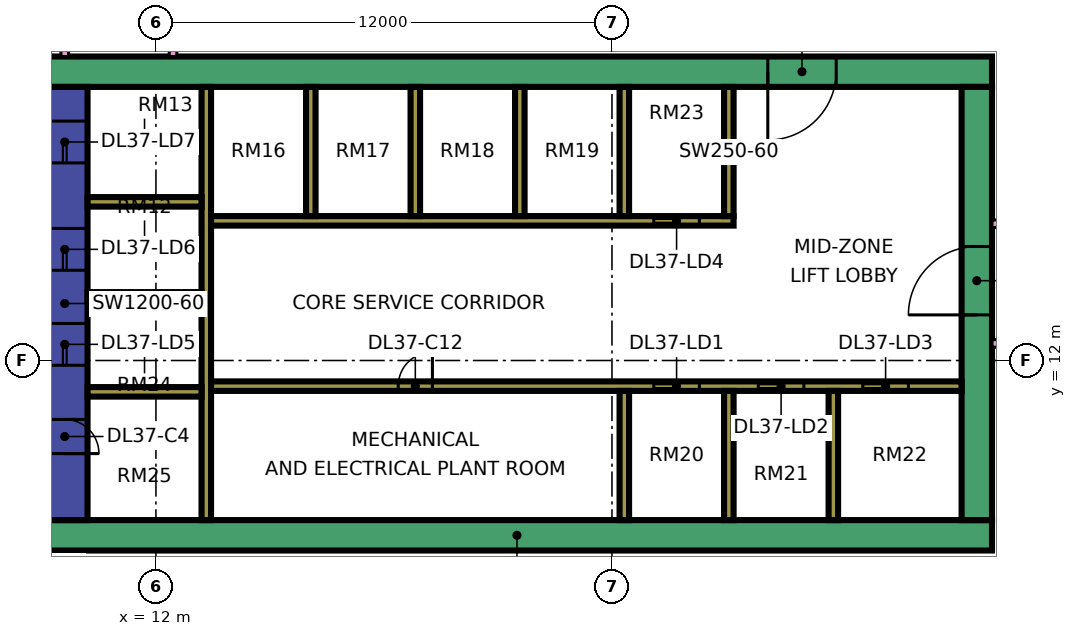
"""IFC4 building model, lengths in metres.
Left out: names, types, materials, properties, quantities, classifications, styles, units other than length and angle.
Written with IfcOpenShell. Run it as: python <this file> out.ifc"""

import sys

from ifc_helpers import new_model, si_unit, direction, frame, frame_2d, origin, place, context, subcontext, project, spatial, rectangle, extrude, element, fill, save


model = new_model("IFC4")
c1 = context("Model", 3, precision=1e-05, world=origin(), true_north=direction((0.0, 1.0)))
c2 = subcontext(c1, "Body", "Model", "MODEL_VIEW")
j1 = project(units=[si_unit("LENGTHUNIT", "METRE"), si_unit("PLANEANGLEUNIT", "RADIAN")], contexts=[c1])
p1 = place(None, origin())
s1 = spatial("IfcSite", under=j1, at=p1, CompositionType="ELEMENT")
p2 = place(p1, origin())
s2 = spatial("IfcBuilding", under=s1, at=p2, CompositionType="ELEMENT")
p3 = place(p2, frame((0.0, 0.0, 164.9)))
s3 = spatial("IfcBuildingStorey", under=s2, at=p3, CompositionType="ELEMENT", Elevation=164.9)
p4 = place(p3, frame((9.0, 7.4, 0.0), z_axis=(0.0, 0.0, 1.0), x_axis=(1.0, 0.0, 0.0)))
e1 = element("IfcWall", 1, at=p4, inside=s3, PredefinedType="SHEAR", context=c2, shape_type="SweptSolid", body=[
    extrude(rectangle(XDim=25.0, YDim=0.8, at=frame_2d((12.5, 0.0))), origin(), (0.0, 0.0, 1.0), 3.75),
])
p5 = place(p3, frame((9.0, 19.6, 0.0), z_axis=(0.0, 0.0, 1.0), x_axis=(1.0, 0.0, 0.0)))
e2 = element("IfcWall", 2, at=p5, inside=s3, PredefinedType="SHEAR", context=c2, shape_type="SweptSolid", body=[
    extrude(rectangle(XDim=25.0, YDim=0.8, at=frame_2d((12.5, 0.0))), origin(), (0.0, 0.0, 1.0), 3.75),
])
p6 = place(p5, frame((19.1, 0.0, 0.0)))
e3 = element("IfcOpeningElement", 3, at=p6, cuts=e2, PredefinedType="OPENING", context=c2, shape_type="SweptSolid", body=[
    extrude(rectangle(XDim=1.8, YDim=2.4, at=frame_2d((0.9, 1.2))), frame((0.0, 0.41, 0.0), z_axis=(0.0, -1.0, 0.0), x_axis=(1.0, 0.0, 0.0)), (0.0, 0.0, 1.0), 0.82),
])
p7 = place(p3, frame((9.6, 7.8, 0.0), z_axis=(0.0, 0.0, 1.0), x_axis=(0.0, 1.0, 0.0)))
e4 = element("IfcWall", 4, at=p7, inside=s3, PredefinedType="SHEAR", context=c2, shape_type="SweptSolid", body=[
    extrude(rectangle(XDim=11.4, YDim=1.2, at=frame_2d((5.7, 0.0))), origin(), (0.0, 0.0, 1.0), 3.75),
])
p8 = place(p7, frame((4.075, 0.0, 0.0)))
e5 = element("IfcOpeningElement", 5, at=p8, cuts=e4, PredefinedType="OPENING", context=c2, shape_type="SweptSolid", body=[
    extrude(rectangle(XDim=1.1, YDim=2.2, at=frame_2d((0.55, 1.1))), frame((0.0, 0.61, 0.0), z_axis=(0.0, -1.0, 0.0), x_axis=(1.0, 0.0, 0.0)), (0.0, 0.0, 1.0), 1.22),
])
p9 = place(p7, frame((6.575, 0.0, 0.0)))
e6 = element("IfcOpeningElement", 6, at=p9, cuts=e4, PredefinedType="OPENING", context=c2, shape_type="SweptSolid", body=[
    extrude(rectangle(XDim=1.1, YDim=2.2, at=frame_2d((0.55, 1.1))), frame((0.0, 0.61, 0.0), z_axis=(0.0, -1.0, 0.0), x_axis=(1.0, 0.0, 0.0)), (0.0, 0.0, 1.0), 1.22),
])
p10 = place(p7, frame((9.4, 0.0, 0.0)))
e7 = element("IfcOpeningElement", 7, at=p10, cuts=e4, PredefinedType="OPENING", context=c2, shape_type="SweptSolid", body=[
    extrude(rectangle(XDim=1.1, YDim=2.2, at=frame_2d((0.55, 1.1))), frame((0.0, 0.61, 0.0), z_axis=(0.0, -1.0, 0.0), x_axis=(1.0, 0.0, 0.0)), (0.0, 0.0, 1.0), 1.22),
])
p11 = place(p7, frame((1.75, 0.0, 0.0)))
e8 = element("IfcOpeningElement", 8, at=p11, cuts=e4, PredefinedType="OPENING", context=c2, shape_type="SweptSolid", body=[
    extrude(rectangle(XDim=0.9, YDim=2.1, at=frame_2d((0.45, 1.05))), frame((0.0, 0.61, 0.0), z_axis=(0.0, -1.0, 0.0), x_axis=(1.0, 0.0, 0.0)), (0.0, 0.0, 1.0), 1.22),
])
p12 = place(p3, frame((33.6, 7.8, 0.0), z_axis=(0.0, 0.0, 1.0), x_axis=(0.0, 1.0, 0.0)))
e9 = element("IfcWall", 9, at=p12, inside=s3, PredefinedType="SHEAR", context=c2, shape_type="SweptSolid", body=[
    extrude(rectangle(XDim=11.4, YDim=0.8, at=frame_2d((5.7, 0.0))), origin(), (0.0, 0.0, 1.0), 3.75),
])
p13 = place(p12, frame((5.4, 0.0, 0.0)))
e10 = element("IfcOpeningElement", 10, at=p13, cuts=e9, PredefinedType="OPENING", context=c2, shape_type="SweptSolid", body=[
    extrude(rectangle(XDim=1.8, YDim=2.4, at=frame_2d((0.9, 1.2))), frame((0.0, 0.41, 0.0), z_axis=(0.0, -1.0, 0.0), x_axis=(1.0, 0.0, 0.0)), (0.0, 0.0, 1.0), 0.82),
])
p14 = place(p3, frame((13.325, 7.8, 0.0), z_axis=(0.0, 0.0, 1.0), x_axis=(0.0, 1.0, 0.0)))
e11 = element("IfcWall", 11, at=p14, inside=s3, PredefinedType="SHEAR", context=c2, shape_type="SweptSolid", body=[
    extrude(rectangle(XDim=11.4, YDim=0.25, at=frame_2d((5.7, 0.0))), origin(), (0.0, 0.0, 1.0), 3.75),
])
p15 = place(p3, frame((13.45, 11.325, 0.0), z_axis=(0.0, 0.0, 1.0), x_axis=(1.0, 0.0, 0.0)))
e12 = element("IfcWall", 12, at=p15, inside=s3, PredefinedType="SHEAR", context=c2, shape_type="SweptSolid", body=[
    extrude(rectangle(XDim=19.75, YDim=0.25, at=frame_2d((9.875, 0.0))), origin(), (0.0, 0.0, 1.0), 3.75),
])
p16 = place(p15, frame((11.65, 0.0, 0.0)))
e13 = element("IfcOpeningElement", 13, at=p16, cuts=e12, PredefinedType="OPENING", context=c2, shape_type="SweptSolid", body=[
    extrude(rectangle(XDim=1.2, YDim=2.2, at=frame_2d((0.6, 1.1))), frame((0.0, 0.135, 0.0), z_axis=(0.0, -1.0, 0.0), x_axis=(1.0, 0.0, 0.0)), (0.0, 0.0, 1.0), 0.27),
])
p17 = place(p15, frame((14.4, 0.0, 0.0)))
e14 = element("IfcOpeningElement", 14, at=p17, cuts=e12, PredefinedType="OPENING", context=c2, shape_type="SweptSolid", body=[
    extrude(rectangle(XDim=1.2, YDim=2.2, at=frame_2d((0.6, 1.1))), frame((0.0, 0.135, 0.0), z_axis=(0.0, -1.0, 0.0), x_axis=(1.0, 0.0, 0.0)), (0.0, 0.0, 1.0), 0.27),
])
p18 = place(p15, frame((17.15, 0.0, 0.0)))
e15 = element("IfcOpeningElement", 15, at=p18, cuts=e12, PredefinedType="OPENING", context=c2, shape_type="SweptSolid", body=[
    extrude(rectangle(XDim=1.2, YDim=2.2, at=frame_2d((0.6, 1.1))), frame((0.0, 0.135, 0.0), z_axis=(0.0, -1.0, 0.0), x_axis=(1.0, 0.0, 0.0)), (0.0, 0.0, 1.0), 0.27),
])
p19 = place(p15, frame((4.925, 0.0, 0.0)))
e16 = element("IfcOpeningElement", 16, at=p19, cuts=e12, PredefinedType="OPENING", context=c2, shape_type="SweptSolid", body=[
    extrude(rectangle(XDim=0.9, YDim=2.1, at=frame_2d((0.45, 1.05))), frame((0.0, 0.135, 0.0), z_axis=(0.0, -1.0, 0.0), x_axis=(1.0, 0.0, 0.0)), (0.0, 0.0, 1.0), 0.27),
])
p20 = place(p3, frame((13.45, 15.675, 0.0), z_axis=(0.0, 0.0, 1.0), x_axis=(1.0, 0.0, 0.0)))
e17 = element("IfcWall", 17, at=p20, inside=s3, PredefinedType="SHEAR", context=c2, shape_type="SweptSolid", body=[
    extrude(rectangle(XDim=13.75, YDim=0.25, at=frame_2d((6.875, 0.0))), origin(), (0.0, 0.0, 1.0), 3.75),
])
p21 = place(p20, frame((11.65, 0.0, 0.0)))
e18 = element("IfcOpeningElement", 18, at=p21, cuts=e17, PredefinedType="OPENING", context=c2, shape_type="SweptSolid", body=[
    extrude(rectangle(XDim=1.2, YDim=2.2, at=frame_2d((0.6, 1.1))), frame((0.0, 0.135, 0.0), z_axis=(0.0, -1.0, 0.0), x_axis=(1.0, 0.0, 0.0)), (0.0, 0.0, 1.0), 0.27),
])
for number, where, z_axis, x_axis in (
    (19, (10.2, 11.175, 0.0), (0.0, 0.0, 1.0), (1.0, 0.0, 0.0)),
    (20, (10.2, 13.675, 0.0), (0.0, 0.0, 1.0), (1.0, 0.0, 0.0)),
    (21, (10.2, 16.175, 0.0), (0.0, 0.0, 1.0), (1.0, 0.0, 0.0)),
):
    element("IfcWall", number, at=place(p3, frame(where, z_axis=z_axis, x_axis=x_axis)), inside=s3, PredefinedType="SHEAR", context=c2, shape_type="SweptSolid", body=[
        extrude(rectangle(XDim=3.0, YDim=0.25, at=frame_2d((1.5, 0.0))), origin(), (0.0, 0.0, 1.0), 3.75),
    ])
for number, where, z_axis, x_axis in (
    (22, (24.325, 7.8, 0.0), (0.0, 0.0, 1.0), (0.0, 1.0, 0.0)),
    (23, (27.075, 7.8, 0.0), (0.0, 0.0, 1.0), (0.0, 1.0, 0.0)),
    (24, (29.825, 7.8, 0.0), (0.0, 0.0, 1.0), (0.0, 1.0, 0.0)),
    (25, (16.075, 15.8, 0.0), (0.0, 0.0, 1.0), (0.0, 1.0, 0.0)),
    (26, (18.825, 15.8, 0.0), (0.0, 0.0, 1.0), (0.0, 1.0, 0.0)),
    (27, (21.575, 15.8, 0.0), (0.0, 0.0, 1.0), (0.0, 1.0, 0.0)),
    (28, (24.325, 15.8, 0.0), (0.0, 0.0, 1.0), (0.0, 1.0, 0.0)),
    (29, (27.075, 15.8, 0.0), (0.0, 0.0, 1.0), (0.0, 1.0, 0.0)),
):
    element("IfcWall", number, at=place(p3, frame(where, z_axis=z_axis, x_axis=x_axis)), inside=s3, PredefinedType="SHEAR", context=c2, shape_type="SweptSolid", body=[
        extrude(rectangle(XDim=3.4, YDim=0.25, at=frame_2d((1.7, 0.0))), origin(), (0.0, 0.0, 1.0), 3.75),
    ])
p22 = place(p3, frame((-1.447, 12.553, 0.0), z_axis=(0.0, 0.0, 1.0), x_axis=(0.707106781187, -0.707106781187, 0.0)))
e30 = element("IfcWall", 30, at=p22, inside=s3, PredefinedType="SOLIDWALL", context=c2, shape_type="SweptSolid", body=[
    extrude(rectangle(XDim=19.799, YDim=0.15, at=frame_2d((9.899, 0.0))), origin(), (0.0, 0.0, 1.0), 3.35),
])
p23 = place(p22, frame((2.212, 0.0, 0.45)))
e31 = element("IfcOpeningElement", 31, at=p23, cuts=e30, PredefinedType="OPENING", context=c2, shape_type="SweptSolid", body=[
    extrude(rectangle(XDim=3.0, YDim=2.4, at=frame_2d((1.5, 1.2))), frame((0.0, 0.085, 0.0), z_axis=(0.0, -1.0, 0.0), x_axis=(1.0, 0.0, 0.0)), (0.0, 0.0, 1.0), 0.17),
])
p24 = place(p22, frame((10.216, 0.0, 0.45)))
e32 = element("IfcOpeningElement", 32, at=p24, cuts=e30, PredefinedType="OPENING", context=c2, shape_type="SweptSolid", body=[
    extrude(rectangle(XDim=3.0, YDim=2.4, at=frame_2d((1.5, 1.2))), frame((0.0, 0.085, 0.0), z_axis=(0.0, -1.0, 0.0), x_axis=(1.0, 0.0, 0.0)), (0.0, 0.0, 1.0), 0.17),
])
p25 = place(p3, frame((9.6, 20.0, 0.0), z_axis=(0.0, 0.0, 1.0), x_axis=(0.0, 1.0, 0.0)))
e33 = element("IfcWall", 33, at=p25, inside=s3, PredefinedType="PARTITIONING", context=c2, shape_type="SweptSolid", body=[
    extrude(rectangle(XDim=44.35, YDim=0.2, at=frame_2d((22.175, 0.0))), origin(), (0.0, 0.0, 1.0), 3.35),
])
p26 = place(p25, frame((28.8, 0.0, 0.0)))
e34 = element("IfcOpeningElement", 34, at=p26, cuts=e33, PredefinedType="OPENING", context=c2, shape_type="SweptSolid", body=[
    extrude(rectangle(XDim=1.0, YDim=2.1, at=frame_2d((0.5, 1.05))), frame((0.0, 0.11, 0.0), z_axis=(0.0, -1.0, 0.0), x_axis=(1.0, 0.0, 0.0)), (0.0, 0.0, 1.0), 0.22),
])
p27 = place(p25, frame((32.1, 0.0, 0.0)))
e35 = element("IfcOpeningElement", 35, at=p27, cuts=e33, PredefinedType="OPENING", context=c2, shape_type="SweptSolid", body=[
    extrude(rectangle(XDim=1.0, YDim=2.1, at=frame_2d((0.5, 1.05))), frame((0.0, 0.11, 0.0), z_axis=(0.0, -1.0, 0.0), x_axis=(1.0, 0.0, 0.0)), (0.0, 0.0, 1.0), 0.22),
])
p28 = place(p25, frame((0.6, 0.0, 0.0)))
e36 = element("IfcOpeningElement", 36, at=p28, cuts=e33, PredefinedType="OPENING", context=c2, shape_type="SweptSolid", body=[
    extrude(rectangle(XDim=1.2, YDim=2.1, at=frame_2d((0.6, 1.05))), frame((0.0, 0.11, 0.0), z_axis=(0.0, -1.0, 0.0), x_axis=(1.0, 0.0, 0.0)), (0.0, 0.0, 1.0), 0.22),
])
p29 = place(p25, frame((14.25, 0.0, 0.0)))
e37 = element("IfcOpeningElement", 37, at=p29, cuts=e33, PredefinedType="OPENING", context=c2, shape_type="SweptSolid", body=[
    extrude(rectangle(XDim=1.0, YDim=2.1, at=frame_2d((0.5, 1.05))), frame((0.0, 0.11, 0.0), z_axis=(0.0, -1.0, 0.0), x_axis=(1.0, 0.0, 0.0)), (0.0, 0.0, 1.0), 0.22),
])
p30 = place(p3, frame((12.45, 20.0, 0.0), z_axis=(0.0, 0.0, 1.0), x_axis=(0.0, 1.0, 0.0)))
e38 = element("IfcWall", 38, at=p30, inside=s3, PredefinedType="PARTITIONING", context=c2, shape_type="SweptSolid", body=[
    extrude(rectangle(XDim=42.926, YDim=0.2, at=frame_2d((21.463, 0.0))), origin(), (0.0, 0.0, 1.0), 3.35),
])
p31 = place(p30, frame((6.55, 0.0, 0.0)))
e39 = element("IfcOpeningElement", 39, at=p31, cuts=e38, PredefinedType="OPENING", context=c2, shape_type="SweptSolid", body=[
    extrude(rectangle(XDim=1.0, YDim=2.1, at=frame_2d((0.5, 1.05))), frame((0.0, 0.11, 0.0), z_axis=(0.0, -1.0, 0.0), x_axis=(1.0, 0.0, 0.0)), (0.0, 0.0, 1.0), 0.22),
])
p32 = place(p30, frame((12.25, 0.0, 0.0)))
e40 = element("IfcOpeningElement", 40, at=p32, cuts=e38, PredefinedType="OPENING", context=c2, shape_type="SweptSolid", body=[
    extrude(rectangle(XDim=1.6, YDim=2.1, at=frame_2d((0.8, 1.05))), frame((0.0, 0.11, 0.0), z_axis=(0.0, -1.0, 0.0), x_axis=(1.0, 0.0, 0.0)), (0.0, 0.0, 1.0), 0.22),
])
p33 = place(p30, frame((16.9, 0.0, 0.0)))
e41 = element("IfcOpeningElement", 41, at=p33, cuts=e38, PredefinedType="OPENING", context=c2, shape_type="SweptSolid", body=[
    extrude(rectangle(XDim=1.0, YDim=2.1, at=frame_2d((0.5, 1.05))), frame((0.0, 0.11, 0.0), z_axis=(0.0, -1.0, 0.0), x_axis=(1.0, 0.0, 0.0)), (0.0, 0.0, 1.0), 0.22),
])
p34 = place(p30, frame((40.9, 0.0, 0.0)))
e42 = element("IfcOpeningElement", 42, at=p34, cuts=e38, PredefinedType="OPENING", context=c2, shape_type="SweptSolid", body=[
    extrude(rectangle(XDim=1.0, YDim=2.1, at=frame_2d((0.5, 1.05))), frame((0.0, 0.11, 0.0), z_axis=(0.0, -1.0, 0.0), x_axis=(1.0, 0.0, 0.0)), (0.0, 0.0, 1.0), 0.22),
])
p35 = place(p30, frame((1.15, 0.0, 0.0)))
e43 = element("IfcOpeningElement", 43, at=p35, cuts=e38, PredefinedType="OPENING", context=c2, shape_type="SweptSolid", body=[
    extrude(rectangle(XDim=1.8, YDim=2.1, at=frame_2d((0.9, 1.05))), frame((0.0, 0.11, 0.0), z_axis=(0.0, -1.0, 0.0), x_axis=(1.0, 0.0, 0.0)), (0.0, 0.0, 1.0), 0.22),
])
p36 = place(p30, frame((28.6, 0.0, 0.0)))
e44 = element("IfcOpeningElement", 44, at=p36, cuts=e38, PredefinedType="OPENING", context=c2, shape_type="SweptSolid", body=[
    extrude(rectangle(XDim=1.8, YDim=2.1, at=frame_2d((0.9, 1.05))), frame((0.0, 0.11, 0.0), z_axis=(0.0, -1.0, 0.0), x_axis=(1.0, 0.0, 0.0)), (0.0, 0.0, 1.0), 0.22),
])
p37 = place(p3, frame((34.0, 12.45, 0.0), z_axis=(0.0, 0.0, 1.0), x_axis=(1.0, 0.0, 0.0)))
e45 = element("IfcWall", 45, at=p37, inside=s3, PredefinedType="PARTITIONING", context=c2, shape_type="SweptSolid", body=[
    extrude(rectangle(XDim=2.451, YDim=0.2, at=frame_2d((1.226, 0.0))), origin(), (0.0, 0.0, 1.0), 3.35),
])
p38 = place(p3, frame((34.0, 15.6, 0.0), z_axis=(0.0, 0.0, 1.0), x_axis=(1.0, 0.0, 0.0)))
e46 = element("IfcWall", 46, at=p38, inside=s3, PredefinedType="PARTITIONING", context=c2, shape_type="SweptSolid", body=[
    extrude(rectangle(XDim=10.35, YDim=0.2, at=frame_2d((5.175, 0.0))), origin(), (0.0, 0.0, 1.0), 3.35),
])
p39 = place(p38, frame((5.6, 0.0, 0.0)))
e47 = element("IfcOpeningElement", 47, at=p39, cuts=e46, PredefinedType="OPENING", context=c2, shape_type="SweptSolid", body=[
    extrude(rectangle(XDim=1.0, YDim=2.1, at=frame_2d((0.5, 1.05))), frame((0.0, 0.11, 0.0), z_axis=(0.0, -1.0, 0.0), x_axis=(1.0, 0.0, 0.0)), (0.0, 0.0, 1.0), 0.22),
])
p40 = place(p38, frame((0.45, 0.0, 0.0)))
e48 = element("IfcOpeningElement", 48, at=p40, cuts=e46, PredefinedType="OPENING", context=c2, shape_type="SweptSolid", body=[
    extrude(rectangle(XDim=1.2, YDim=2.1, at=frame_2d((0.6, 1.05))), frame((0.0, 0.11, 0.0), z_axis=(0.0, -1.0, 0.0), x_axis=(1.0, 0.0, 0.0)), (0.0, 0.0, 1.0), 0.22),
])
p41 = place(p16, origin())
e49 = element("IfcDoor", 49, at=p41, inside=s3, OperationType="DOUBLE_DOOR_SLIDING", PredefinedType="DOOR", context=c2, shape_type="SweptSolid", body=[
    extrude(rectangle(XDim=1.2, YDim=2.2, at=frame_2d((0.6, 1.1))), frame((0.0, 0.025, 0.0), z_axis=(0.0, -1.0, 0.0), x_axis=(1.0, 0.0, 0.0)), (0.0, 0.0, 1.0), 0.05),
])
fill(e13, e49)
p42 = place(p17, origin())
e50 = element("IfcDoor", 50, at=p42, inside=s3, OperationType="DOUBLE_DOOR_SLIDING", PredefinedType="DOOR", context=c2, shape_type="SweptSolid", body=[
    extrude(rectangle(XDim=1.2, YDim=2.2, at=frame_2d((0.6, 1.1))), frame((0.0, 0.025, 0.0), z_axis=(0.0, -1.0, 0.0), x_axis=(1.0, 0.0, 0.0)), (0.0, 0.0, 1.0), 0.05),
])
fill(e14, e50)
p43 = place(p18, origin())
e51 = element("IfcDoor", 51, at=p43, inside=s3, OperationType="DOUBLE_DOOR_SLIDING", PredefinedType="DOOR", context=c2, shape_type="SweptSolid", body=[
    extrude(rectangle(XDim=1.2, YDim=2.2, at=frame_2d((0.6, 1.1))), frame((0.0, 0.025, 0.0), z_axis=(0.0, -1.0, 0.0), x_axis=(1.0, 0.0, 0.0)), (0.0, 0.0, 1.0), 0.05),
])
fill(e15, e51)
p44 = place(p21, origin())
e52 = element("IfcDoor", 52, at=p44, inside=s3, OperationType="DOUBLE_DOOR_SLIDING", PredefinedType="DOOR", context=c2, shape_type="SweptSolid", body=[
    extrude(rectangle(XDim=1.2, YDim=2.2, at=frame_2d((0.6, 1.1))), frame((0.0, 0.025, 0.0), z_axis=(0.0, -1.0, 0.0), x_axis=(1.0, 0.0, 0.0)), (0.0, 0.0, 1.0), 0.05),
])
fill(e18, e52)
p45 = place(p8, origin())
e53 = element("IfcDoor", 53, at=p45, inside=s3, OperationType="DOUBLE_DOOR_SLIDING", PredefinedType="DOOR", context=c2, shape_type="SweptSolid", body=[
    extrude(rectangle(XDim=1.1, YDim=2.2, at=frame_2d((0.55, 1.1))), frame((0.0, 0.025, 0.0), z_axis=(0.0, -1.0, 0.0), x_axis=(1.0, 0.0, 0.0)), (0.0, 0.0, 1.0), 0.05),
])
fill(e5, e53)
p46 = place(p9, origin())
e54 = element("IfcDoor", 54, at=p46, inside=s3, OperationType="DOUBLE_DOOR_SLIDING", PredefinedType="DOOR", context=c2, shape_type="SweptSolid", body=[
    extrude(rectangle(XDim=1.1, YDim=2.2, at=frame_2d((0.55, 1.1))), frame((0.0, 0.025, 0.0), z_axis=(0.0, -1.0, 0.0), x_axis=(1.0, 0.0, 0.0)), (0.0, 0.0, 1.0), 0.05),
])
fill(e6, e54)
p47 = place(p10, origin())
e55 = element("IfcDoor", 55, at=p47, inside=s3, OperationType="DOUBLE_DOOR_SLIDING", PredefinedType="DOOR", context=c2, shape_type="SweptSolid", body=[
    extrude(rectangle(XDim=1.1, YDim=2.2, at=frame_2d((0.55, 1.1))), frame((0.0, 0.025, 0.0), z_axis=(0.0, -1.0, 0.0), x_axis=(1.0, 0.0, 0.0)), (0.0, 0.0, 1.0), 0.05),
])
fill(e7, e55)
p48 = place(p13, origin())
e56 = element("IfcDoor", 56, at=p48, inside=s3, OperationType="DOUBLE_DOOR_SINGLE_SWING", PredefinedType="DOOR", context=c2, shape_type="SweptSolid", body=[
    extrude(rectangle(XDim=1.8, YDim=2.4, at=frame_2d((0.9, 1.2))), frame((0.0, 0.025, 0.0), z_axis=(0.0, -1.0, 0.0), x_axis=(1.0, 0.0, 0.0)), (0.0, 0.0, 1.0), 0.05),
])
fill(e10, e56)
p49 = place(p6, frame((1.8, 0.0, 0.0), z_axis=(0.0, 0.0, 1.0), x_axis=(-1.0, 0.0, 0.0)))
e57 = element("IfcDoor", 57, at=p49, inside=s3, OperationType="DOUBLE_DOOR_SINGLE_SWING", PredefinedType="DOOR", context=c2, shape_type="SweptSolid", body=[
    extrude(rectangle(XDim=1.8, YDim=2.4, at=frame_2d((0.9, 1.2))), frame((0.0, 0.025, 0.0), z_axis=(0.0, -1.0, 0.0), x_axis=(1.0, 0.0, 0.0)), (0.0, 0.0, 1.0), 0.05),
])
fill(e3, e57)
p50 = place(p11, frame((0.9, 0.0, 0.0), z_axis=(0.0, 0.0, 1.0), x_axis=(-1.0, 0.0, 0.0)))
e58 = element("IfcDoor", 58, at=p50, inside=s3, OperationType="SINGLE_SWING_LEFT", PredefinedType="DOOR", context=c2, shape_type="SweptSolid", body=[
    extrude(rectangle(XDim=0.9, YDim=2.1, at=frame_2d((0.45, 1.05))), frame((0.0, 0.025, 0.0), z_axis=(0.0, -1.0, 0.0), x_axis=(1.0, 0.0, 0.0)), (0.0, 0.0, 1.0), 0.05),
])
fill(e8, e58)
p51 = place(p19, frame((0.9, 0.0, 0.0), z_axis=(0.0, 0.0, 1.0), x_axis=(-1.0, 0.0, 0.0)))
e59 = element("IfcDoor", 59, at=p51, inside=s3, OperationType="SINGLE_SWING_RIGHT", PredefinedType="DOOR", context=c2, shape_type="SweptSolid", body=[
    extrude(rectangle(XDim=0.9, YDim=2.1, at=frame_2d((0.45, 1.05))), frame((0.0, 0.025, 0.0), z_axis=(0.0, -1.0, 0.0), x_axis=(1.0, 0.0, 0.0)), (0.0, 0.0, 1.0), 0.05),
])
fill(e16, e59)
save(model, sys.argv[1])
